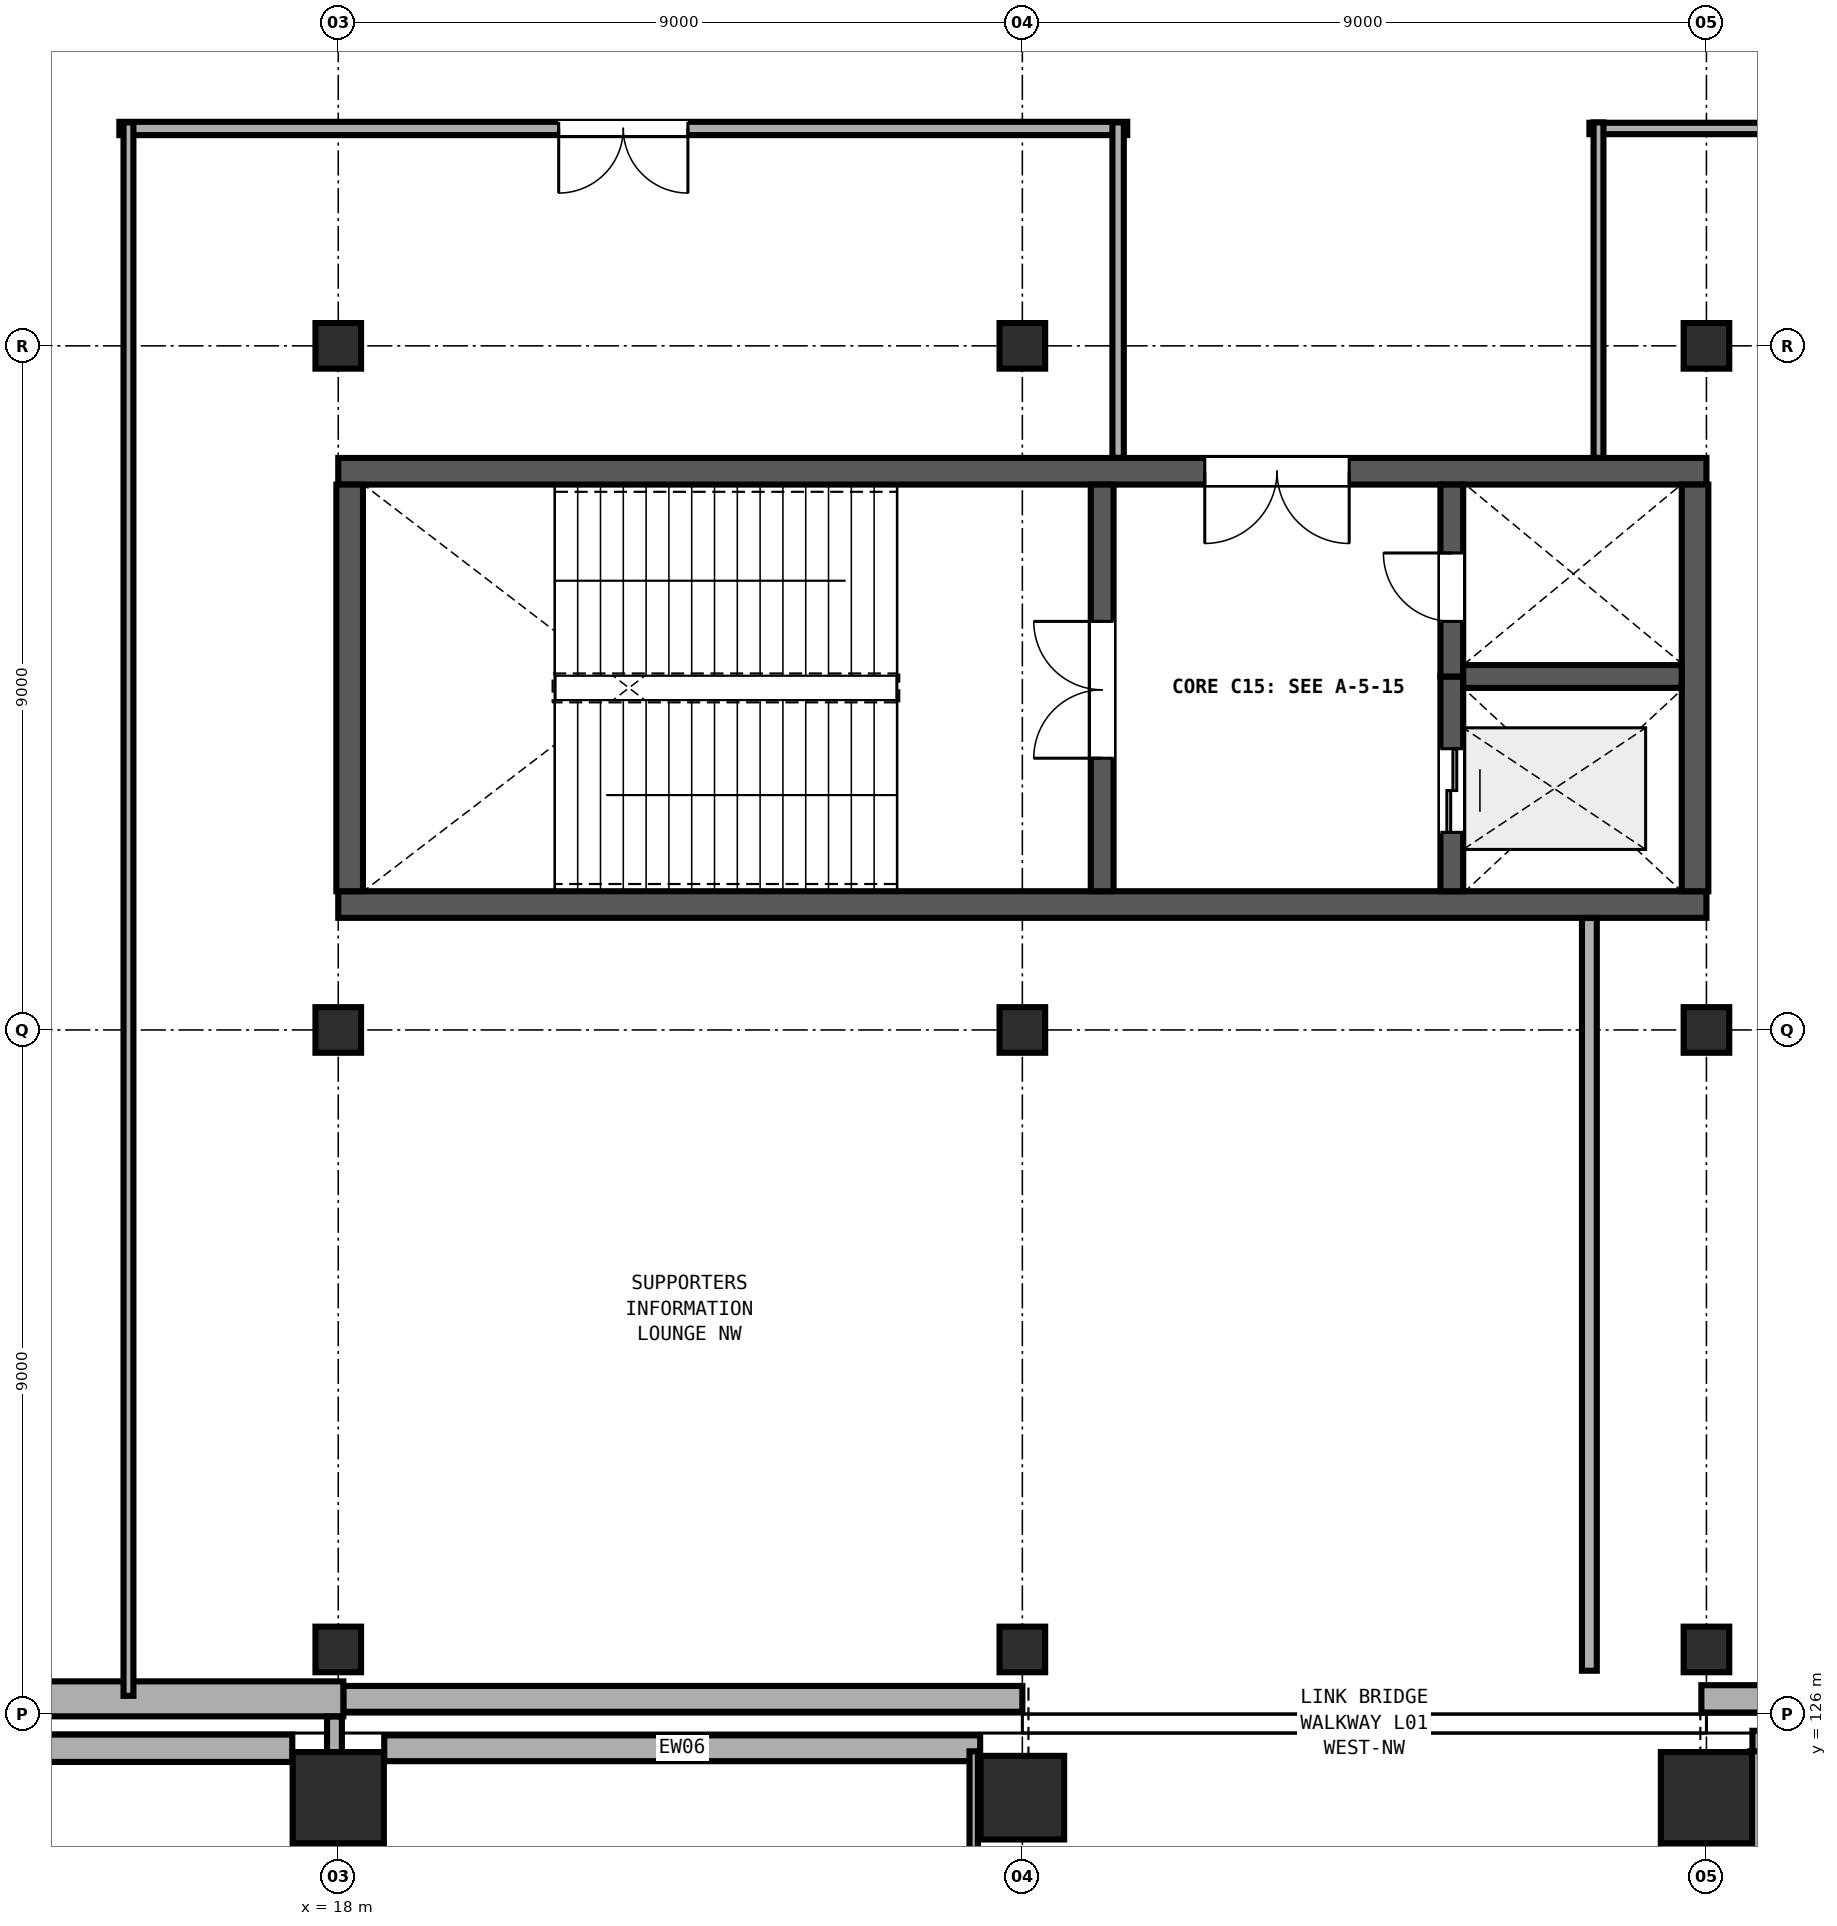
"""IFC4 building model, lengths in metres.
Left out: names, types, materials, properties, quantities, classifications, styles, units other than length and angle.
Written with IfcOpenShell. Run it as: python <this file> out.ifc"""

import sys

from ifc_helpers import new_model, si_unit, direction, frame, frame_2d, origin, origin_2d, place, context, subcontext, project, spatial, rectangle, extrude, element, fill, save


model = new_model("IFC4")
c1 = context("Model", 3, precision=1e-05, world=origin(), true_north=direction((0.0, 1.0)))
c2 = subcontext(c1, "Body", "Model", "MODEL_VIEW")
j1 = project(units=[si_unit("LENGTHUNIT", "METRE"), si_unit("PLANEANGLEUNIT", "RADIAN")], contexts=[c1])
p1 = place(None, origin())
s1 = spatial("IfcSite", under=j1, at=p1, CompositionType="ELEMENT")
p2 = place(p1, origin())
s2 = spatial("IfcBuilding", under=s1, at=p2, CompositionType="ELEMENT")
p3 = place(p2, frame((0.0, 0.0, 4.8)))
s3 = spatial("IfcBuildingStorey", under=s2, at=p3, CompositionType="ELEMENT", Elevation=4.8)
p4 = place(p3, frame((18.0, 124.9, 0.0), z_axis=(0.0, 0.0, 1.0), x_axis=(1.0, 0.0, 0.0)))
e1 = element("IfcColumn", 1, at=p4, inside=s3, PredefinedType="COLUMN", context=c2, shape_type="SweptSolid", body=[
    extrude(rectangle(XDim=1.2, YDim=1.2, at=origin_2d()), origin(), (0.0, 0.0, 1.0), 4.8),
])
p5 = place(p3, frame((27.0, 124.9, 0.0), z_axis=(0.0, 0.0, 1.0), x_axis=(1.0, 0.0, 0.0)))
e2 = element("IfcColumn", 2, at=p5, inside=s3, PredefinedType="COLUMN", context=c2, shape_type="SweptSolid", body=[
    extrude(rectangle(XDim=1.1, YDim=1.1, at=origin_2d()), origin(), (0.0, 0.0, 1.0), 4.8),
])
p6 = place(p3, frame((36.0, 124.9, 0.0), z_axis=(0.0, 0.0, 1.0), x_axis=(1.0, 0.0, 0.0)))
e3 = element("IfcColumn", 3, at=p6, inside=s3, PredefinedType="COLUMN", context=c2, shape_type="SweptSolid", body=[
    extrude(rectangle(XDim=1.2, YDim=1.2, at=origin_2d()), origin(), (0.0, 0.0, 1.0), 4.8),
])
for number, where, z_axis, x_axis in (
    (4, (18.0, 126.85, 0.0), (0.0, 0.0, 1.0), (1.0, 0.0, 0.0)),
    (5, (18.0, 135.0, 0.0), (0.0, 0.0, 1.0), (1.0, 0.0, 0.0)),
    (6, (18.0, 144.0, 0.0), (0.0, 0.0, 1.0), (1.0, 0.0, 0.0)),
    (7, (27.0, 126.85, 0.0), (0.0, 0.0, 1.0), (1.0, 0.0, 0.0)),
    (8, (27.0, 135.0, 0.0), (0.0, 0.0, 1.0), (1.0, 0.0, 0.0)),
    (9, (27.0, 144.0, 0.0), (0.0, 0.0, 1.0), (1.0, 0.0, 0.0)),
    (10, (36.0, 126.85, 0.0), (0.0, 0.0, 1.0), (1.0, 0.0, 0.0)),
    (11, (36.0, 135.0, 0.0), (0.0, 0.0, 1.0), (1.0, 0.0, 0.0)),
    (12, (36.0, 144.0, 0.0), (0.0, 0.0, 1.0), (1.0, 0.0, 0.0)),
):
    element("IfcColumn", number, at=place(p3, frame(where, z_axis=z_axis, x_axis=x_axis)), inside=s3, PredefinedType="COLUMN", context=c2, shape_type="SweptSolid", body=[
        extrude(rectangle(XDim=0.6, YDim=0.6, at=origin_2d()), origin(), (0.0, 0.0, 1.0), 4.8),
    ])
p7 = place(p3, frame((18.0, 136.65, 0.0), z_axis=(0.0, 0.0, 1.0), x_axis=(1.0, 0.0, 0.0)))
e13 = element("IfcWall", 13, at=p7, inside=s3, PredefinedType="SHEAR", context=c2, shape_type="SweptSolid", body=[
    extrude(rectangle(XDim=18.0, YDim=0.35, at=frame_2d((9.0, 0.0))), origin(), (0.0, 0.0, 1.0), 4.565),
])
p8 = place(p3, frame((36.0, 142.35, 0.0), z_axis=(0.0, 0.0, 1.0), x_axis=(-1.0, 0.0, 0.0)))
e14 = element("IfcWall", 14, at=p8, inside=s3, PredefinedType="SHEAR", context=c2, shape_type="SweptSolid", body=[
    extrude(rectangle(XDim=18.0, YDim=0.35, at=frame_2d((9.0, 0.0))), origin(), (0.0, 0.0, 1.0), 4.565),
])
p9 = place(p8, frame((4.7, 0.0, 0.0)))
e15 = element("IfcOpeningElement", 15, at=p9, cuts=e14, PredefinedType="OPENING", context=c2, shape_type="SweptSolid", body=[
    extrude(rectangle(XDim=1.9, YDim=2.25, at=frame_2d((0.95, 1.125))), frame((0.0, 0.185, 0.0), z_axis=(0.0, -1.0, 0.0), x_axis=(1.0, 0.0, 0.0)), (0.0, 0.0, 1.0), 0.37),
])
for number, where, z_axis, x_axis in (
    (16, (18.15, 142.175, 0.0), (0.0, 0.0, 1.0), (0.0, -1.0, 0.0)),
    (17, (35.85, 136.825, 0.0), (0.0, 0.0, 1.0), (0.0, 1.0, 0.0)),
):
    element("IfcWall", number, at=place(p3, frame(where, z_axis=z_axis, x_axis=x_axis)), inside=s3, PredefinedType="SHEAR", context=c2, shape_type="SweptSolid", body=[
        extrude(rectangle(XDim=5.35, YDim=0.35, at=frame_2d((2.675, 0.0))), origin(), (0.0, 0.0, 1.0), 4.565),
    ])
p10 = place(p3, frame((28.05, 136.825, 0.0), z_axis=(0.0, 0.0, 1.0), x_axis=(0.0, 1.0, 0.0)))
e18 = element("IfcWall", 18, at=p10, inside=s3, PredefinedType="SHEAR", context=c2, shape_type="SweptSolid", body=[
    extrude(rectangle(XDim=5.35, YDim=0.3, at=frame_2d((2.675, 0.0))), origin(), (0.0, 0.0, 1.0), 4.565),
])
p11 = place(p10, frame((1.75, 0.0, 0.0)))
e19 = element("IfcOpeningElement", 19, at=p11, cuts=e18, PredefinedType="OPENING", context=c2, shape_type="SweptSolid", body=[
    extrude(rectangle(XDim=1.8, YDim=2.25, at=frame_2d((0.9, 1.125))), frame((0.0, 0.16, 0.0), z_axis=(0.0, -1.0, 0.0), x_axis=(1.0, 0.0, 0.0)), (0.0, 0.0, 1.0), 0.32),
])
p12 = place(p3, frame((32.65, 136.825, 0.0), z_axis=(0.0, 0.0, 1.0), x_axis=(0.0, 1.0, 0.0)))
e20 = element("IfcWall", 20, at=p12, inside=s3, PredefinedType="SHEAR", context=c2, shape_type="SweptSolid", body=[
    extrude(rectangle(XDim=2.825, YDim=0.3, at=frame_2d((1.413, 0.0))), origin(), (0.0, 0.0, 1.0), 4.565),
])
p13 = place(p12, frame((0.775, 0.0, 0.0)))
e21 = element("IfcOpeningElement", 21, at=p13, cuts=e20, PredefinedType="OPENING", context=c2, shape_type="SweptSolid", body=[
    extrude(rectangle(XDim=1.1, YDim=2.1, at=frame_2d((0.55, 1.05))), frame((0.0, 0.16, 0.0), z_axis=(0.0, -1.0, 0.0), x_axis=(1.0, 0.0, 0.0)), (0.0, 0.0, 1.0), 0.32),
])
p14 = place(p3, frame((32.65, 139.65, 0.0), z_axis=(0.0, 0.0, 1.0), x_axis=(0.0, 1.0, 0.0)))
e22 = element("IfcWall", 22, at=p14, inside=s3, PredefinedType="SHEAR", context=c2, shape_type="SweptSolid", body=[
    extrude(rectangle(XDim=2.525, YDim=0.3, at=frame_2d((1.263, 0.0))), origin(), (0.0, 0.0, 1.0), 4.565),
])
p15 = place(p14, frame((0.725, 0.0, 0.0)))
e23 = element("IfcOpeningElement", 23, at=p15, cuts=e22, PredefinedType="OPENING", context=c2, shape_type="SweptSolid", body=[
    extrude(rectangle(XDim=0.9, YDim=2.1, at=frame_2d((0.45, 1.05))), frame((0.0, 0.16, 0.0), z_axis=(0.0, -1.0, 0.0), x_axis=(1.0, 0.0, 0.0)), (0.0, 0.0, 1.0), 0.32),
])
p16 = place(p3, frame((32.8, 139.65, 0.0), z_axis=(0.0, 0.0, 1.0), x_axis=(1.0, 0.0, 0.0)))
e24 = element("IfcWall", 24, at=p16, inside=s3, PredefinedType="SHEAR", context=c2, shape_type="SweptSolid", body=[
    extrude(rectangle(XDim=2.875, YDim=0.3, at=frame_2d((1.438, 0.0))), origin(), (0.0, 0.0, 1.0), 4.565),
])
p17 = place(p3, frame((9.555, 125.55, 0.0), z_axis=(0.0, 0.0, 1.0), x_axis=(1.0, 0.0, 0.0)))
e25 = element("IfcWall", 25, at=p17, inside=s3, PredefinedType="SOLIDWALL", context=c2, shape_type="SweptSolid", body=[
    extrude(rectangle(XDim=7.84, YDim=0.36, at=frame_2d((3.92, 0.0))), origin(), (0.0, 0.0, 1.0), 3.28),
])
p18 = place(p3, frame((18.605, 125.55, 0.0), z_axis=(0.0, 0.0, 1.0), x_axis=(1.0, 0.0, 0.0)))
e26 = element("IfcWall", 26, at=p18, inside=s3, PredefinedType="SOLIDWALL", context=c2, shape_type="SweptSolid", body=[
    extrude(rectangle(XDim=7.84, YDim=0.34, at=frame_2d((3.92, 0.0))), origin(), (0.0, 0.0, 1.0), 3.28),
])
p19 = place(p3, frame((36.605, 125.55, 0.0), z_axis=(0.0, 0.0, 1.0), x_axis=(1.0, 0.0, 0.0)))
e27 = element("IfcWall", 27, at=p19, inside=s3, PredefinedType="SOLIDWALL", context=c2, shape_type="SweptSolid", body=[
    extrude(rectangle(XDim=7.14, YDim=0.46, at=frame_2d((3.57, 0.0))), origin(), (0.0, 0.0, 1.0), 3.28),
])
p20 = place(p3, frame((44.867, 126.2, 0.0), z_axis=(0.0, 0.0, 1.0), x_axis=(-1.0, 0.0, 0.0)))
e28 = element("IfcWall", 28, at=p20, inside=s3, PredefinedType="SOLIDWALL", context=c2, shape_type="SweptSolid", body=[
    extrude(rectangle(XDim=8.933, YDim=0.36, at=frame_2d((4.467, 0.0))), origin(), (0.0, 0.0, 1.0), 3.28),
])
p21 = place(p3, frame((27.0, 126.2, 0.0), z_axis=(0.0, 0.0, 1.0), x_axis=(-1.0, 0.0, 0.0)))
e29 = element("IfcWall", 29, at=p21, inside=s3, PredefinedType="SOLIDWALL", context=c2, shape_type="SweptSolid", body=[
    extrude(rectangle(XDim=8.933, YDim=0.34, at=frame_2d((4.467, 0.0))), origin(), (0.0, 0.0, 1.0), 3.28),
])
p22 = place(p3, frame((18.067, 126.2, 0.0), z_axis=(0.0, 0.0, 1.0), x_axis=(-1.0, 0.0, 0.0)))
e30 = element("IfcWall", 30, at=p22, inside=s3, PredefinedType="SOLIDWALL", context=c2, shape_type="SweptSolid", body=[
    extrude(rectangle(XDim=8.933, YDim=0.46, at=frame_2d((4.467, 0.0))), origin(), (0.0, 0.0, 1.0), 3.28),
])
p23 = place(p3, frame((17.95, 125.967, 0.0), z_axis=(0.0, 0.0, 1.0), x_axis=(0.0, -1.0, 0.0)))
e31 = element("IfcWall", 31, at=p23, inside=s3, PredefinedType="PARTITIONING", context=c2, shape_type="SweptSolid", body=[
    extrude(rectangle(XDim=17.14, YDim=0.195, at=frame_2d((8.57, 0.0))), origin(), (0.0, 0.0, 1.0), 3.28),
])
p24 = place(p3, frame((26.36, 125.51, 0.0), z_axis=(0.0, 0.0, 1.0), x_axis=(0.0, -1.0, 0.0)))
e32 = element("IfcWall", 32, at=p24, inside=s3, PredefinedType="PARTITIONING", context=c2, shape_type="SweptSolid", body=[
    extrude(rectangle(XDim=3.01, YDim=0.11, at=frame_2d((1.505, 0.0))), origin(), (0.0, 0.0, 1.0), 3.28),
])
p25 = place(p3, frame((36.64, 122.5, 0.0), z_axis=(0.0, 0.0, 1.0), x_axis=(0.0, 1.0, 0.0)))
e33 = element("IfcWall", 33, at=p25, inside=s3, PredefinedType="PARTITIONING", context=c2, shape_type="SweptSolid", body=[
    extrude(rectangle(XDim=3.01, YDim=0.13, at=frame_2d((1.505, 0.0))), origin(), (0.0, 0.0, 1.0), 3.28),
])
p26 = place(p3, frame((50.71, 146.86, 0.0), z_axis=(0.0, 0.0, 1.0), x_axis=(-1.0, 0.0, 0.0)))
e34 = element("IfcWall", 34, at=p26, inside=s3, PredefinedType="PARTITIONING", context=c2, shape_type="SweptSolid", body=[
    extrude(rectangle(XDim=16.25, YDim=0.15, at=frame_2d((8.125, 0.0))), origin(), (0.0, 0.0, 1.0), 3.28),
])
p27 = place(p26, frame((7.425, 0.0, 0.0)))
e35 = element("IfcOpeningElement", 35, at=p27, cuts=e34, PredefinedType="OPENING", context=c2, shape_type="SweptSolid", body=[
    extrude(rectangle(XDim=1.4, YDim=2.15, at=frame_2d((0.7, 1.075))), frame((0.0, 0.085, 0.0), z_axis=(0.0, -1.0, 0.0), x_axis=(1.0, 0.0, 0.0)), (0.0, 0.0, 1.0), 0.17),
])
p28 = place(p3, frame((34.58, 142.527, 0.0), z_axis=(0.0, 0.0, 1.0), x_axis=(0.0, 1.0, 0.0)))
e36 = element("IfcWall", 36, at=p28, inside=s3, PredefinedType="PARTITIONING", context=c2, shape_type="SweptSolid", body=[
    extrude(rectangle(XDim=4.413, YDim=0.13, at=frame_2d((2.207, 0.0))), origin(), (0.0, 0.0, 1.0), 3.28),
])
p29 = place(p3, frame((34.46, 126.57, 0.0), z_axis=(0.0, 0.0, 1.0), x_axis=(0.0, 1.0, 0.0)))
e37 = element("IfcWall", 37, at=p29, inside=s3, PredefinedType="PARTITIONING", context=c2, shape_type="SweptSolid", body=[
    extrude(rectangle(XDim=9.903, YDim=0.195, at=frame_2d((4.951, 0.0))), origin(), (0.0, 0.0, 1.0), 3.28),
])
p30 = place(p3, frame((28.38, 146.86, 0.0), z_axis=(0.0, 0.0, 1.0), x_axis=(-1.0, 0.0, 0.0)))
e38 = element("IfcWall", 38, at=p30, inside=s3, PredefinedType="PARTITIONING", context=c2, shape_type="SweptSolid", body=[
    extrude(rectangle(XDim=13.26, YDim=0.175, at=frame_2d((6.63, 0.0))), origin(), (0.0, 0.0, 1.0), 3.28),
])
p31 = place(p30, frame((5.78, 0.0, 0.0)))
e39 = element("IfcOpeningElement", 39, at=p31, cuts=e38, PredefinedType="OPENING", context=c2, shape_type="SweptSolid", body=[
    extrude(rectangle(XDim=1.7, YDim=2.2, at=frame_2d((0.85, 1.1))), frame((0.0, 0.097, 0.0), z_axis=(0.0, -1.0, 0.0), x_axis=(1.0, 0.0, 0.0)), (0.0, 0.0, 1.0), 0.195),
])
p32 = place(p3, frame((28.26, 146.94, 0.0), z_axis=(0.0, 0.0, 1.0), x_axis=(0.0, -1.0, 0.0)))
e40 = element("IfcWall", 40, at=p32, inside=s3, PredefinedType="PARTITIONING", context=c2, shape_type="SweptSolid", body=[
    extrude(rectangle(XDim=4.413, YDim=0.15, at=frame_2d((2.207, 0.0))), origin(), (0.0, 0.0, 1.0), 3.28),
])
p33 = place(p3, frame((15.24, 126.24, 0.0), z_axis=(0.0, 0.0, 1.0), x_axis=(0.0, 1.0, 0.0)))
e41 = element("IfcWall", 41, at=p33, inside=s3, PredefinedType="PARTITIONING", context=c2, shape_type="SweptSolid", body=[
    extrude(rectangle(XDim=20.7, YDim=0.13, at=frame_2d((10.35, 0.0))), origin(), (0.0, 0.0, 1.0), 3.28),
])
p34 = place(p11, origin())
e42 = element("IfcDoor", 42, at=p34, inside=s3, OperationType="DOUBLE_DOOR_SINGLE_SWING", PredefinedType="DOOR", context=c2, shape_type="SweptSolid", body=[
    extrude(rectangle(XDim=1.8, YDim=2.25, at=frame_2d((0.9, 1.125))), frame((0.0, 0.025, 0.0), z_axis=(0.0, -1.0, 0.0), x_axis=(1.0, 0.0, 0.0)), (0.0, 0.0, 1.0), 0.05),
])
fill(e19, e42)
p35 = place(p15, origin())
e43 = element("IfcDoor", 43, at=p35, inside=s3, OperationType="SINGLE_SWING_RIGHT", PredefinedType="DOOR", context=c2, shape_type="SweptSolid", body=[
    extrude(rectangle(XDim=0.9, YDim=2.1, at=frame_2d((0.45, 1.05))), frame((0.0, 0.025, 0.0), z_axis=(0.0, -1.0, 0.0), x_axis=(1.0, 0.0, 0.0)), (0.0, 0.0, 1.0), 0.05),
])
fill(e23, e43)
p36 = place(p13, origin())
e44 = element("IfcDoor", 44, at=p36, inside=s3, OperationType="DOUBLE_DOOR_SLIDING", PredefinedType="DOOR", context=c2, shape_type="SweptSolid", body=[
    extrude(rectangle(XDim=1.1, YDim=2.1, at=frame_2d((0.55, 1.05))), frame((0.0, 0.025, 0.0), z_axis=(0.0, -1.0, 0.0), x_axis=(1.0, 0.0, 0.0)), (0.0, 0.0, 1.0), 0.05),
])
fill(e21, e44)
p37 = place(p9, origin())
e45 = element("IfcDoor", 45, at=p37, inside=s3, OperationType="DOUBLE_DOOR_SINGLE_SWING", PredefinedType="DOOR", context=c2, shape_type="SweptSolid", body=[
    extrude(rectangle(XDim=1.9, YDim=2.25, at=frame_2d((0.95, 1.125))), frame((0.0, 0.025, 0.0), z_axis=(0.0, -1.0, 0.0), x_axis=(1.0, 0.0, 0.0)), (0.0, 0.0, 1.0), 0.05),
])
fill(e15, e45)
p38 = place(p31, origin())
e46 = element("IfcDoor", 46, at=p38, inside=s3, OperationType="DOUBLE_DOOR_SINGLE_SWING", PredefinedType="DOOR", context=c2, shape_type="SweptSolid", body=[
    extrude(rectangle(XDim=1.7, YDim=2.2, at=frame_2d((0.85, 1.1))), frame((0.0, 0.025, 0.0), z_axis=(0.0, -1.0, 0.0), x_axis=(1.0, 0.0, 0.0)), (0.0, 0.0, 1.0), 0.05),
])
fill(e39, e46)
save(model, sys.argv[1])
